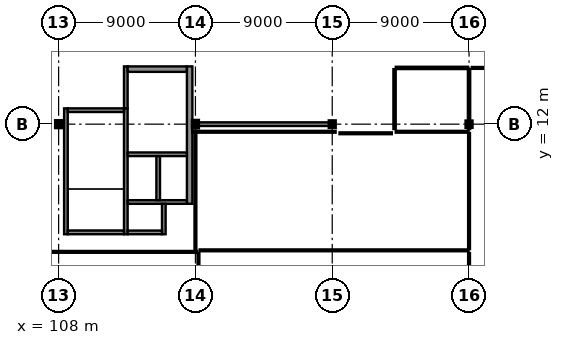
"""IFC4 building model, lengths in metres.
Left out: names, types, materials, properties, quantities, classifications, styles, units other than length and angle.
Written with IfcOpenShell. Run it as: python <this file> out.ifc"""

import sys

from ifc_helpers import new_model, si_unit, direction, frame, frame_2d, origin, origin_2d, place, context, subcontext, project, spatial, rectangle, i_section, extrude, element, fill, save


model = new_model("IFC4")
c1 = context("Model", 3, precision=1e-05, world=origin(), true_north=direction((0.0, 1.0)))
c2 = subcontext(c1, "Body", "Model", "MODEL_VIEW")
j1 = project(units=[si_unit("LENGTHUNIT", "METRE"), si_unit("PLANEANGLEUNIT", "RADIAN")], contexts=[c1])
p1 = place(None, origin())
s1 = spatial("IfcSite", under=j1, at=p1, CompositionType="ELEMENT")
p2 = place(p1, origin())
s2 = spatial("IfcBuilding", under=s1, at=p2, CompositionType="ELEMENT")
p3 = place(p2, frame((0.0, 0.0, 14.4)))
s3 = spatial("IfcBuildingStorey", under=s2, at=p3, CompositionType="ELEMENT", Elevation=14.4)
p4 = place(p3, frame((108.0, 12.0, 0.0), z_axis=(0.0, 0.0, 1.0), x_axis=(1.0, 0.0, 0.0)))
e1 = element("IfcColumn", 1, at=p4, inside=s3, PredefinedType="COLUMN", context=c2, shape_type="SweptSolid", body=[
    extrude(i_section(OverallWidth=0.3, OverallDepth=0.36, WebThickness=0.012, FlangeThickness=0.022, at=origin_2d()), origin(), (0.0, 0.0, 1.0), 4.5),
])
p5 = place(p3, frame((117.0, 12.0, 0.0), z_axis=(0.0, 0.0, 1.0), x_axis=(0.0, 1.0, 0.0)))
e2 = element("IfcColumn", 2, at=p5, inside=s3, PredefinedType="COLUMN", context=c2, shape_type="SweptSolid", body=[
    extrude(i_section(OverallWidth=0.3, OverallDepth=0.4, WebThickness=0.013, FlangeThickness=0.024, at=origin_2d()), origin(), (0.0, 0.0, 1.0), 4.5),
])
p6 = place(p3, frame((126.0, 12.0, 0.0), z_axis=(0.0, 0.0, 1.0), x_axis=(1.0, 0.0, 0.0)))
e3 = element("IfcColumn", 3, at=p6, inside=s3, PredefinedType="COLUMN", context=c2, shape_type="SweptSolid", body=[
    extrude(i_section(OverallWidth=0.3, OverallDepth=0.34, WebThickness=0.012, FlangeThickness=0.021, at=origin_2d()), origin(), (0.0, 0.0, 1.0), 4.5),
])
p7 = place(p3, frame((135.0, 12.0, 0.0), z_axis=(0.0, 0.0, 1.0), x_axis=(1.0, 0.0, 0.0)))
e4 = element("IfcColumn", 4, at=p7, inside=s3, PredefinedType="COLUMN", context=c2, shape_type="SweptSolid", body=[
    extrude(i_section(OverallWidth=0.3, OverallDepth=0.32, WebThickness=0.011, FlangeThickness=0.021, at=origin_2d()), origin(), (0.0, 0.0, 1.0), 4.5),
])
p8 = place(p3, frame((108.48, 4.76, 0.0), z_axis=(0.0, 0.0, 1.0), x_axis=(0.0, 1.0, 0.0)))
e5 = element("IfcWall", 5, at=p8, inside=s3, PredefinedType="SHEAR", context=c2, shape_type="SweptSolid", body=[
    extrude(rectangle(XDim=8.28, YDim=0.24, at=frame_2d((4.14, 0.0))), origin(), (0.0, 0.0, 1.0), 4.31),
])
p9 = place(p3, frame((112.42, 4.76, 0.0), z_axis=(0.0, 0.0, 1.0), x_axis=(0.0, 1.0, 0.0)))
e6 = element("IfcWall", 6, at=p9, inside=s3, PredefinedType="SHEAR", context=c2, shape_type="SweptSolid", body=[
    extrude(rectangle(XDim=8.28, YDim=0.24, at=frame_2d((4.14, 0.0))), origin(), (0.0, 0.0, 1.0), 4.31),
])
p10 = place(p9, frame((6.49, 0.0, 0.0)))
e7 = element("IfcOpeningElement", 7, at=p10, cuts=e6, PredefinedType="OPENING", context=c2, shape_type="SweptSolid", body=[
    extrude(rectangle(XDim=1.3, YDim=2.2, at=frame_2d((0.65, 1.1))), frame((0.0, 0.135, 0.0), z_axis=(0.0, -1.0, 0.0), x_axis=(1.0, 0.0, 0.0)), (0.0, 0.0, 1.0), 0.27),
])
for number, where, z_axis, x_axis in (
    (8, (108.6, 4.88, 0.0), (0.0, 0.0, 1.0), (1.0, 0.0, 0.0)),
    (9, (108.6, 12.92, 0.0), (0.0, 0.0, 1.0), (1.0, 0.0, 0.0)),
):
    element("IfcWall", number, at=place(p3, frame(where, z_axis=z_axis, x_axis=x_axis)), inside=s3, PredefinedType="SHEAR", context=c2, shape_type="SweptSolid", body=[
        extrude(rectangle(XDim=3.7, YDim=0.24, at=frame_2d((1.85, 0.0))), origin(), (0.0, 0.0, 1.0), 4.31),
    ])
p11 = place(p3, frame((112.42, 13.04, 0.0), z_axis=(0.0, 0.0, 1.0), x_axis=(0.0, 1.0, 0.0)))
e10 = element("IfcWall", 10, at=p11, inside=s3, PredefinedType="SHEAR", context=c2, shape_type="SweptSolid", body=[
    extrude(rectangle(XDim=2.76, YDim=0.24, at=frame_2d((1.38, 0.0))), origin(), (0.0, 0.0, 1.0), 4.16),
])
p12 = place(p3, frame((112.54, 15.62, 0.0), z_axis=(0.0, 0.0, 1.0), x_axis=(1.0, 0.0, 0.0)))
e11 = element("IfcWall", 11, at=p12, inside=s3, PredefinedType="SHEAR", context=c2, shape_type="SweptSolid", body=[
    extrude(rectangle(XDim=3.9, YDim=0.36, at=frame_2d((1.95, 0.0))), origin(), (0.0, 0.0, 1.0), 4.16),
])
p13 = place(p12, frame((1.15, 0.0, 0.0)))
e12 = element("IfcOpeningElement", 12, at=p13, cuts=e11, PredefinedType="OPENING", context=c2, shape_type="SweptSolid", body=[
    extrude(rectangle(XDim=1.6, YDim=2.25, at=frame_2d((0.8, 1.125))), frame((0.0, 0.195, 0.0), z_axis=(0.0, -1.0, 0.0), x_axis=(1.0, 0.0, 0.0)), (0.0, 0.0, 1.0), 0.39),
])
p14 = place(p3, frame((116.62, 6.76, 0.0), z_axis=(0.0, 0.0, 1.0), x_axis=(0.0, 1.0, 0.0)))
e13 = element("IfcWall", 13, at=p14, inside=s3, PredefinedType="SHEAR", context=c2, shape_type="SweptSolid", body=[
    extrude(rectangle(XDim=9.04, YDim=0.36, at=frame_2d((4.52, 0.0))), origin(), (0.0, 0.0, 1.0), 4.16),
])
p15 = place(p3, frame((112.54, 10.02, 0.0), z_axis=(0.0, 0.0, 1.0), x_axis=(1.0, 0.0, 0.0)))
e14 = element("IfcWall", 14, at=p15, inside=s3, PredefinedType="SHEAR", context=c2, shape_type="SweptSolid", body=[
    extrude(rectangle(XDim=3.9, YDim=0.24, at=frame_2d((1.95, 0.0))), origin(), (0.0, 0.0, 1.0), 4.31),
])
p16 = place(p15, frame((0.235, 0.0, 0.0)))
e15 = element("IfcOpeningElement", 15, at=p16, cuts=e14, PredefinedType="OPENING", context=c2, shape_type="SweptSolid", body=[
    extrude(rectangle(XDim=1.6, YDim=2.3, at=frame_2d((0.8, 1.15))), frame((0.0, 0.135, 0.0), z_axis=(0.0, -1.0, 0.0), x_axis=(1.0, 0.0, 0.0)), (0.0, 0.0, 1.0), 0.27),
])
p17 = place(p15, frame((2.185, 0.0, 0.0)))
e16 = element("IfcOpeningElement", 16, at=p17, cuts=e14, PredefinedType="OPENING", context=c2, shape_type="SweptSolid", body=[
    extrude(rectangle(XDim=1.6, YDim=2.3, at=frame_2d((0.8, 1.15))), frame((0.0, 0.135, 0.0), z_axis=(0.0, -1.0, 0.0), x_axis=(1.0, 0.0, 0.0)), (0.0, 0.0, 1.0), 0.27),
])
p18 = place(p3, frame((112.54, 6.88, 0.0), z_axis=(0.0, 0.0, 1.0), x_axis=(1.0, 0.0, 0.0)))
e17 = element("IfcWall", 17, at=p18, inside=s3, PredefinedType="SHEAR", context=c2, shape_type="SweptSolid", body=[
    extrude(rectangle(XDim=3.9, YDim=0.24, at=frame_2d((1.95, 0.0))), origin(), (0.0, 0.0, 1.0), 4.31),
])
p19 = place(p3, frame((114.55, 7.0, 0.0), z_axis=(0.0, 0.0, 1.0), x_axis=(0.0, 1.0, 0.0)))
e18 = element("IfcWall", 18, at=p19, inside=s3, PredefinedType="SHEAR", context=c2, shape_type="SweptSolid", body=[
    extrude(rectangle(XDim=2.9, YDim=0.24, at=frame_2d((1.45, 0.0))), origin(), (0.0, 0.0, 1.0), 4.31),
])
p20 = place(p3, frame((114.92, 4.76, 0.0), z_axis=(0.0, 0.0, 1.0), x_axis=(0.0, 1.0, 0.0)))
e19 = element("IfcWall", 19, at=p20, inside=s3, PredefinedType="SHEAR", context=c2, shape_type="SweptSolid", body=[
    extrude(rectangle(XDim=2.0, YDim=0.24, at=frame_2d((1.0, 0.0))), origin(), (0.0, 0.0, 1.0), 4.31),
])
p21 = place(p3, frame((112.54, 4.88, 0.0), z_axis=(0.0, 0.0, 1.0), x_axis=(1.0, 0.0, 0.0)))
e20 = element("IfcWall", 20, at=p21, inside=s3, PredefinedType="SHEAR", context=c2, shape_type="SweptSolid", body=[
    extrude(rectangle(XDim=2.26, YDim=0.24, at=frame_2d((1.13, 0.0))), origin(), (0.0, 0.0, 1.0), 4.31),
])
p22 = place(p3, frame((117.198, 12.0, 0.0), z_axis=(0.0, 0.0, 1.0), x_axis=(1.0, 0.0, 0.0)))
e21 = element("IfcWall", 21, at=p22, inside=s3, PredefinedType="SHEAR", context=c2, shape_type="SweptSolid", body=[
    extrude(rectangle(XDim=8.794, YDim=0.24, at=frame_2d((4.397, 0.0))), origin(), (0.0, 0.0, 1.0), 3.575),
])
p23 = place(p3, frame((117.2, 3.52, 0.0), z_axis=(0.0, 0.0, 1.0), x_axis=(0.0, -1.0, 0.0)))
e22 = element("IfcWall", 22, at=p23, inside=s3, PredefinedType="PARTITIONING", context=c2, shape_type="SweptSolid", body=[
    extrude(rectangle(XDim=3.342, YDim=0.12, at=frame_2d((1.671, 0.0))), origin(), (0.0, 0.0, 1.0), 4.14),
])
p24 = place(p3, frame((53.87, 3.6, 0.0), z_axis=(0.0, 0.0, 1.0), x_axis=(1.0, 0.0, 0.0)))
e23 = element("IfcWall", 23, at=p24, inside=s3, PredefinedType="PARTITIONING", context=c2, shape_type="SweptSolid", body=[
    extrude(rectangle(XDim=63.25, YDim=0.12, at=frame_2d((31.625, 0.0))), origin(), (0.0, 0.0, 1.0), 4.14),
])
p25 = place(p24, frame((19.855, 0.0, 0.0)))
e24 = element("IfcOpeningElement", 24, at=p25, cuts=e23, PredefinedType="OPENING", context=c2, shape_type="SweptSolid", body=[
    extrude(rectangle(XDim=0.95, YDim=2.15, at=frame_2d((0.475, 1.075))), frame((0.0, 0.075, 0.0), z_axis=(0.0, -1.0, 0.0), x_axis=(1.0, 0.0, 0.0)), (0.0, 0.0, 1.0), 0.15),
])
p26 = place(p3, frame((130.18, 11.5, 0.0), z_axis=(0.0, 0.0, 1.0), x_axis=(1.0, 0.0, 0.0)))
e25 = element("IfcWall", 25, at=p26, inside=s3, PredefinedType="PARTITIONING", context=c2, shape_type="SweptSolid", body=[
    extrude(rectangle(XDim=4.74, YDim=0.12, at=frame_2d((2.37, 0.0))), origin(), (0.0, 0.0, 1.0), 4.14),
])
p27 = place(p3, frame((135.0, 11.42, 0.0), z_axis=(0.0, 0.0, 1.0), x_axis=(0.0, -1.0, 0.0)))
e26 = element("IfcWall", 26, at=p27, inside=s3, PredefinedType="PARTITIONING", context=c2, shape_type="SweptSolid", body=[
    extrude(rectangle(XDim=7.64, YDim=0.12, at=frame_2d((3.82, 0.0))), origin(), (0.0, 0.0, 1.0), 3.785),
])
p28 = place(p3, frame((134.92, 3.7, 0.0), z_axis=(0.0, 0.0, 1.0), x_axis=(-1.0, 0.0, 0.0)))
e27 = element("IfcWall", 27, at=p28, inside=s3, PredefinedType="PARTITIONING", context=c2, shape_type="SweptSolid", body=[
    extrude(rectangle(XDim=17.64, YDim=0.12, at=frame_2d((8.82, 0.0))), origin(), (0.0, 0.0, 1.0), 4.14),
])
p29 = place(p3, frame((117.0, 3.655, 0.0), z_axis=(0.0, 0.0, 1.0), x_axis=(0.0, 1.0, 0.0)))
e28 = element("IfcWall", 28, at=p29, inside=s3, PredefinedType="PARTITIONING", context=c2, shape_type="SweptSolid", body=[
    extrude(rectangle(XDim=7.765, YDim=0.12, at=frame_2d((3.882, 0.0))), origin(), (0.0, 0.0, 1.0), 3.575),
])
p30 = place(p3, frame((116.795, 11.5, 0.0), z_axis=(0.0, 0.0, 1.0), x_axis=(1.0, 0.0, 0.0)))
e29 = element("IfcWall", 29, at=p30, inside=s3, PredefinedType="PARTITIONING", context=c2, shape_type="SweptSolid", body=[
    extrude(rectangle(XDim=9.425, YDim=0.12, at=frame_2d((4.712, 0.0))), origin(), (0.0, 0.0, 1.0), 4.14),
])
p31 = place(p3, frame((126.48, 11.4, 0.0), z_axis=(0.0, 0.0, 1.0), x_axis=(1.0, 0.0, 0.0)))
e30 = element("IfcWall", 30, at=p31, inside=s3, PredefinedType="PARTITIONING", context=c2, shape_type="SweptSolid", body=[
    extrude(rectangle(XDim=3.44, YDim=0.12, at=frame_2d((1.72, 0.0))), origin(), (0.0, 0.0, 1.0), 4.14),
])
p32 = place(p31, frame((1.27, 0.0, 0.0)))
e31 = element("IfcOpeningElement", 31, at=p32, cuts=e30, PredefinedType="OPENING", context=c2, shape_type="SweptSolid", body=[
    extrude(rectangle(XDim=0.9, YDim=2.1, at=frame_2d((0.45, 1.05))), frame((0.0, 0.075, 0.0), z_axis=(0.0, -1.0, 0.0), x_axis=(1.0, 0.0, 0.0)), (0.0, 0.0, 1.0), 0.15),
])
p33 = place(p3, frame((130.1, 11.68, 0.0), z_axis=(0.0, 0.0, 1.0), x_axis=(0.0, 1.0, 0.0)))
e32 = element("IfcWall", 32, at=p33, inside=s3, PredefinedType="PARTITIONING", context=c2, shape_type="SweptSolid", body=[
    extrude(rectangle(XDim=3.94, YDim=0.15, at=frame_2d((1.97, 0.0))), origin(), (0.0, 0.0, 1.0), 4.14),
])
p34 = place(p3, frame((130.18, 15.7, 0.0), z_axis=(0.0, 0.0, 1.0), x_axis=(1.0, 0.0, 0.0)))
e33 = element("IfcWall", 33, at=p34, inside=s3, PredefinedType="PARTITIONING", context=c2, shape_type="SweptSolid", body=[
    extrude(rectangle(XDim=4.74, YDim=0.15, at=frame_2d((2.37, 0.0))), origin(), (0.0, 0.0, 1.0), 4.14),
])
p35 = place(p34, frame((1.845, 0.0, 0.0)))
e34 = element("IfcOpeningElement", 34, at=p35, cuts=e33, PredefinedType="OPENING", context=c2, shape_type="SweptSolid", body=[
    extrude(rectangle(XDim=1.05, YDim=2.25, at=frame_2d((0.525, 1.125))), frame((0.0, 0.09, 0.0), z_axis=(0.0, -1.0, 0.0), x_axis=(1.0, 0.0, 0.0)), (0.0, 0.0, 1.0), 0.18),
])
p36 = place(p3, frame((135.0, 15.62, 0.0), z_axis=(0.0, 0.0, 1.0), x_axis=(0.0, -1.0, 0.0)))
e35 = element("IfcWall", 35, at=p36, inside=s3, PredefinedType="PARTITIONING", context=c2, shape_type="SweptSolid", body=[
    extrude(rectangle(XDim=3.94, YDim=0.15, at=frame_2d((1.97, 0.0))), origin(), (0.0, 0.0, 1.0), 3.785),
])
p37 = place(p3, frame((135.18, 15.7, 0.0), z_axis=(0.0, 0.0, 1.0), x_axis=(1.0, 0.0, 0.0)))
e36 = element("IfcWall", 36, at=p37, inside=s3, PredefinedType="PARTITIONING", context=c2, shape_type="SweptSolid", body=[
    extrude(rectangle(XDim=12.275, YDim=0.12, at=frame_2d((6.138, 0.0))), origin(), (0.0, 0.0, 1.0), 4.14),
])
p38 = place(p37, frame((5.662, 0.0, 0.0)))
e37 = element("IfcOpeningElement", 37, at=p38, cuts=e36, PredefinedType="OPENING", context=c2, shape_type="SweptSolid", body=[
    extrude(rectangle(XDim=0.95, YDim=2.15, at=frame_2d((0.475, 1.075))), frame((0.0, 0.075, 0.0), z_axis=(0.0, -1.0, 0.0), x_axis=(1.0, 0.0, 0.0)), (0.0, 0.0, 1.0), 0.15),
])
p39 = place(p3, frame((135.0, 0.48, 0.0), z_axis=(0.0, 0.0, 1.0), x_axis=(0.0, 1.0, 0.0)))
e38 = element("IfcWall", 38, at=p39, inside=s3, PredefinedType="PARTITIONING", context=c2, shape_type="SweptSolid", body=[
    extrude(rectangle(XDim=3.04, YDim=0.12, at=frame_2d((1.52, 0.0))), origin(), (0.0, 0.0, 1.0), 3.785),
])
p40 = place(p10, frame((1.3, 0.0, 0.0), z_axis=(0.0, 0.0, 1.0), x_axis=(-1.0, 0.0, 0.0)))
e39 = element("IfcDoor", 39, at=p40, inside=s3, OperationType="SINGLE_SWING_LEFT", PredefinedType="DOOR", context=c2, shape_type="SweptSolid", body=[
    extrude(rectangle(XDim=1.3, YDim=2.2, at=frame_2d((0.65, 1.1))), frame((0.0, 0.025, 0.0), z_axis=(0.0, -1.0, 0.0), x_axis=(1.0, 0.0, 0.0)), (0.0, 0.0, 1.0), 0.05),
])
fill(e7, e39)
p41 = place(p13, origin())
e40 = element("IfcDoor", 40, at=p41, inside=s3, OperationType="DOUBLE_DOOR_SINGLE_SWING", PredefinedType="DOOR", context=c2, shape_type="SweptSolid", body=[
    extrude(rectangle(XDim=1.6, YDim=2.25, at=frame_2d((0.8, 1.125))), frame((0.0, 0.025, 0.0), z_axis=(0.0, -1.0, 0.0), x_axis=(1.0, 0.0, 0.0)), (0.0, 0.0, 1.0), 0.05),
])
fill(e12, e40)
p42 = place(p16, origin())
e41 = element("IfcDoor", 41, at=p42, inside=s3, OperationType="DOUBLE_DOOR_SLIDING", PredefinedType="DOOR", context=c2, shape_type="SweptSolid", body=[
    extrude(rectangle(XDim=1.6, YDim=2.3, at=frame_2d((0.8, 1.15))), frame((0.0, 0.025, 0.0), z_axis=(0.0, -1.0, 0.0), x_axis=(1.0, 0.0, 0.0)), (0.0, 0.0, 1.0), 0.05),
])
fill(e15, e41)
p43 = place(p17, origin())
e42 = element("IfcDoor", 42, at=p43, inside=s3, OperationType="DOUBLE_DOOR_SLIDING", PredefinedType="DOOR", context=c2, shape_type="SweptSolid", body=[
    extrude(rectangle(XDim=1.6, YDim=2.3, at=frame_2d((0.8, 1.15))), frame((0.0, 0.025, 0.0), z_axis=(0.0, -1.0, 0.0), x_axis=(1.0, 0.0, 0.0)), (0.0, 0.0, 1.0), 0.05),
])
fill(e16, e42)
p44 = place(p32, origin())
e43 = element("IfcDoor", 43, at=p44, inside=s3, OperationType="SINGLE_SWING_RIGHT", PredefinedType="DOOR", context=c2, shape_type="SweptSolid", body=[
    extrude(rectangle(XDim=0.9, YDim=2.1, at=frame_2d((0.45, 1.05))), frame((0.0, 0.025, 0.0), z_axis=(0.0, -1.0, 0.0), x_axis=(1.0, 0.0, 0.0)), (0.0, 0.0, 1.0), 0.05),
])
fill(e31, e43)
p45 = place(p35, frame((1.05, 0.0, 0.0), z_axis=(0.0, 0.0, 1.0), x_axis=(-1.0, 0.0, 0.0)))
e44 = element("IfcDoor", 44, at=p45, inside=s3, OperationType="SINGLE_SWING_LEFT", PredefinedType="DOOR", context=c2, shape_type="SweptSolid", body=[
    extrude(rectangle(XDim=1.05, YDim=2.25, at=frame_2d((0.525, 1.125))), frame((0.0, 0.025, 0.0), z_axis=(0.0, -1.0, 0.0), x_axis=(1.0, 0.0, 0.0)), (0.0, 0.0, 1.0), 0.05),
])
fill(e34, e44)
save(model, sys.argv[1])
